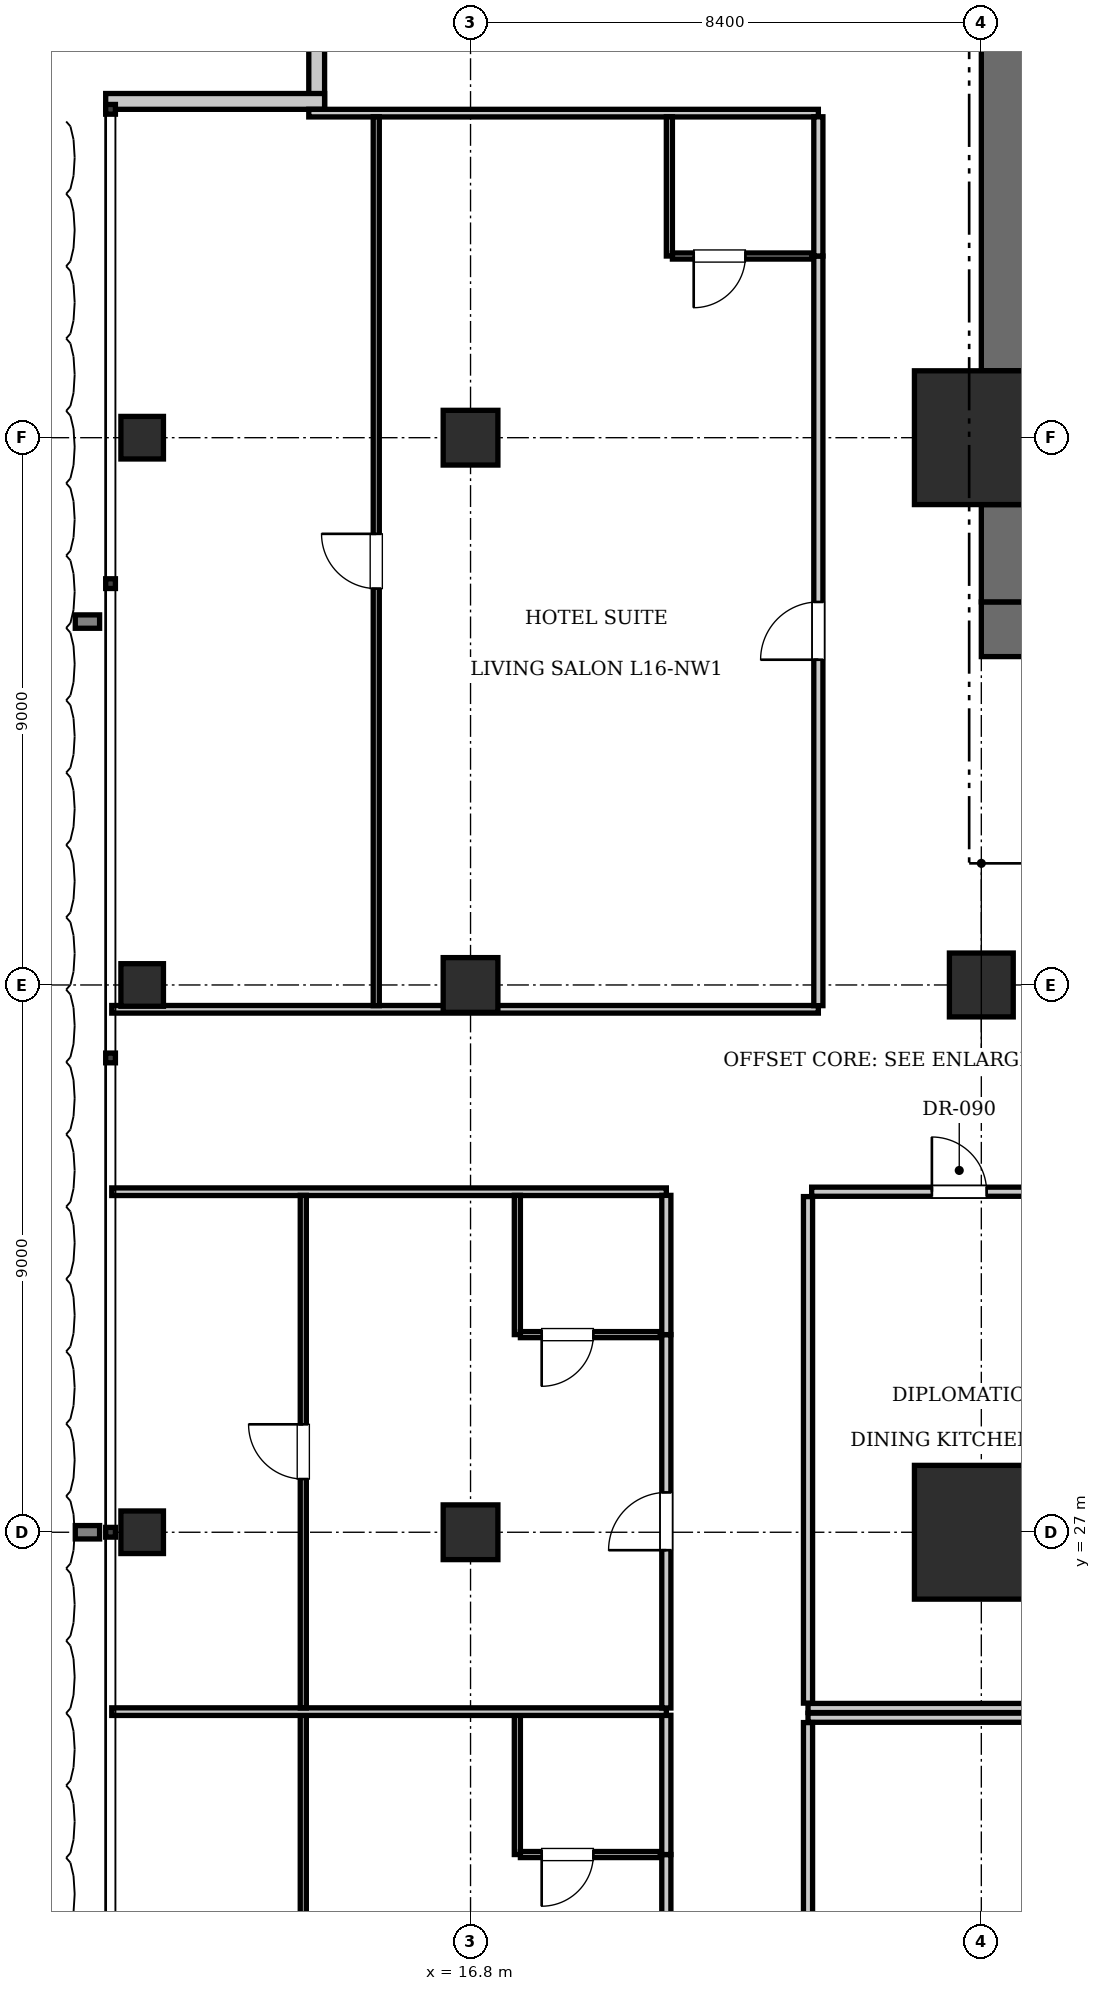
"""IFC4 building model, lengths in metres.
Left out: names, types, materials, properties, quantities, classifications, styles, units other than length and angle.
Written with IfcOpenShell. Run it as: python <this file> out.ifc"""

import sys

from ifc_helpers import new_model, si_unit, direction, frame, frame_2d, origin, origin_2d, place, context, subcontext, project, spatial, rectangle, i_section, extrude, element, fill, save


model = new_model("IFC4")
c1 = context("Model", 3, precision=1e-05, world=origin(), true_north=direction((0.0, 1.0)))
c2 = subcontext(c1, "Body", "Model", "MODEL_VIEW")
j1 = project(units=[si_unit("LENGTHUNIT", "METRE"), si_unit("PLANEANGLEUNIT", "RADIAN")], contexts=[c1])
p1 = place(None, origin())
s1 = spatial("IfcSite", under=j1, at=p1, CompositionType="ELEMENT")
p2 = place(p1, origin())
s2 = spatial("IfcBuilding", under=s1, at=p2, CompositionType="ELEMENT")
p3 = place(p2, frame((0.0, 0.0, 69.3)))
s3 = spatial("IfcBuildingStorey", under=s2, at=p3, CompositionType="ELEMENT", Elevation=69.3)
for number, where, z_axis, x_axis in (
    (1, (25.2, 27.0, 0.0), (0.0, 0.0, 1.0), (1.0, 0.0, 0.0)),
    (2, (25.2, 45.0, 0.0), (0.0, 0.0, 1.0), (1.0, 0.0, 0.0)),
):
    element("IfcColumn", number, at=place(p3, frame(where, z_axis=z_axis, x_axis=x_axis)), inside=s3, PredefinedType="COLUMN", context=c2, shape_type="SweptSolid", body=[
        extrude(rectangle(XDim=2.2, YDim=2.2, at=origin_2d()), origin(), (0.0, 0.0, 1.0), 3.85),
    ])
p4 = place(p3, frame((25.2, 41.85, 0.0), z_axis=(0.0, 0.0, 1.0), x_axis=(1.0, 0.0, 0.0)))
e3 = element("IfcWall", 3, at=p4, inside=s3, PredefinedType="SHEAR", context=c2, shape_type="SweptSolid", body=[
    extrude(rectangle(XDim=6.8, YDim=0.9, at=frame_2d((3.4, 0.0))), origin(), (0.0, 0.0, 1.0), 3.85),
])
p5 = place(p4, frame((1.65, 0.0, 0.0)))
e4 = element("IfcOpeningElement", 4, at=p5, cuts=e3, PredefinedType="OPENING", context=c2, shape_type="SweptSolid", body=[
    extrude(rectangle(XDim=1.15, YDim=2.15, at=frame_2d((0.575, 1.075))), frame((0.0, 0.46, 0.0), z_axis=(0.0, -1.0, 0.0), x_axis=(1.0, 0.0, 0.0)), (0.0, 0.0, 1.0), 0.92),
])
p6 = place(p4, frame((5.15, 0.0, 0.0)))
e5 = element("IfcOpeningElement", 5, at=p6, cuts=e3, PredefinedType="OPENING", context=c2, shape_type="SweptSolid", body=[
    extrude(rectangle(XDim=1.1, YDim=2.2, at=frame_2d((0.55, 1.1))), frame((0.0, 0.46, 0.0), z_axis=(0.0, -1.0, 0.0), x_axis=(1.0, 0.0, 0.0)), (0.0, 0.0, 1.0), 0.92),
])
p7 = place(p3, frame((25.65, 42.3, 0.0), z_axis=(0.0, 0.0, 1.0), x_axis=(0.0, 1.0, 0.0)))
e6 = element("IfcWall", 6, at=p7, inside=s3, PredefinedType="SHEAR", context=c2, shape_type="SweptSolid", body=[
    extrude(rectangle(XDim=1.6, YDim=0.9, at=frame_2d((0.8, 0.0))), origin(), (0.0, 0.0, 1.0), 3.85),
])
p8 = place(p3, frame((25.65, 46.1, 0.0), z_axis=(0.0, 0.0, 1.0), x_axis=(0.0, 1.0, 0.0)))
e7 = element("IfcWall", 7, at=p8, inside=s3, PredefinedType="SHEAR", context=c2, shape_type="SweptSolid", body=[
    extrude(rectangle(XDim=7.0, YDim=0.9, at=frame_2d((3.5, 0.0))), origin(), (0.0, 0.0, 1.0), 3.85),
])
p9 = place(p3, frame((25.2, 36.0, 0.0), z_axis=(0.0, 0.0, 1.0), x_axis=(1.0, 0.0, 0.0)))
e8 = element("IfcColumn", 8, at=p9, inside=s3, PredefinedType="COLUMN", context=c2, shape_type="SweptSolid", body=[
    extrude(rectangle(XDim=1.05, YDim=1.05, at=origin_2d()), origin(), (0.0, 0.0, 1.0), 3.85),
])
for number, where, z_axis, x_axis in (
    (9, (16.8, 27.0, 0.0), (0.0, 0.0, 1.0), (1.0, 0.0, 0.0)),
    (10, (16.8, 36.0, 0.0), (0.0, 0.0, 1.0), (1.0, 0.0, 0.0)),
    (11, (16.8, 45.0, 0.0), (0.0, 0.0, 1.0), (1.0, 0.0, 0.0)),
):
    element("IfcColumn", number, at=place(p3, frame(where, z_axis=z_axis, x_axis=x_axis)), inside=s3, PredefinedType="COLUMN", context=c2, shape_type="SweptSolid", body=[
        extrude(rectangle(XDim=0.9, YDim=0.9, at=origin_2d()), origin(), (0.0, 0.0, 1.0), 3.85),
    ])
for number, where, z_axis, x_axis in (
    (12, (11.4, 27.0, 0.0), (0.0, 0.0, 1.0), (1.0, 0.0, 0.0)),
    (13, (11.4, 36.0, 0.0), (0.0, 0.0, 1.0), (1.0, 0.0, 0.0)),
    (14, (11.4, 45.0, 0.0), (0.0, 0.0, 1.0), (1.0, 0.0, 0.0)),
):
    element("IfcColumn", number, at=place(p3, frame(where, z_axis=z_axis, x_axis=x_axis)), inside=s3, PredefinedType="COLUMN", context=c2, shape_type="SweptSolid", body=[
        extrude(i_section(OverallWidth=0.7, OverallDepth=0.7, WebThickness=0.028, FlangeThickness=0.044, at=origin_2d()), origin(), (0.0, 0.0, 1.0), 3.85),
    ])
p10 = place(p3, frame((14.27, 50.4, 0.0), z_axis=(0.0, 0.0, 1.0), x_axis=(0.0, 1.0, 0.0)))
e15 = element("IfcWall", 15, at=p10, inside=s3, PredefinedType="SOLIDWALL", context=c2, shape_type="SweptSolid", body=[
    extrude(rectangle(XDim=3.6, YDim=0.26, at=frame_2d((1.8, 0.0))), origin(), (0.0, 0.0, 1.0), 3.61),
])
p11 = place(p3, frame((10.8, 50.53, 0.0), z_axis=(0.0, 0.0, 1.0), x_axis=(1.0, 0.0, 0.0)))
e16 = element("IfcWall", 16, at=p11, inside=s3, PredefinedType="SOLIDWALL", context=c2, shape_type="SweptSolid", body=[
    extrude(rectangle(XDim=3.6, YDim=0.26, at=frame_2d((1.8, 0.0))), origin(), (0.0, 0.0, 1.0), 3.61),
])
p12 = place(p3, frame((22.35, 24.11, 0.0), z_axis=(0.0, 0.0, 1.0), x_axis=(1.0, 0.0, 0.0)))
e17 = element("IfcWall", 17, at=p12, inside=s3, PredefinedType="PARTITIONING", context=c2, shape_type="SweptSolid", body=[
    extrude(rectangle(XDim=30.9, YDim=0.15, at=frame_2d((15.45, 0.0))), origin(), (0.0, 0.0, 1.0), 3.61),
])
p13 = place(p3, frame((22.35, 24.19, 0.0), z_axis=(0.0, 0.0, 1.0), x_axis=(0.0, 1.0, 0.0)))
e18 = element("IfcWall", 18, at=p13, inside=s3, PredefinedType="PARTITIONING", context=c2, shape_type="SweptSolid", body=[
    extrude(rectangle(XDim=8.33, YDim=0.15, at=frame_2d((4.165, 0.0))), origin(), (0.0, 0.0, 1.0), 3.61),
])
p14 = place(p3, frame((22.41, 32.6, 0.0), z_axis=(0.0, 0.0, 1.0), x_axis=(1.0, 0.0, 0.0)))
e19 = element("IfcWall", 19, at=p14, inside=s3, PredefinedType="PARTITIONING", context=c2, shape_type="SweptSolid", body=[
    extrude(rectangle(XDim=4.854, YDim=0.15, at=frame_2d((2.427, 0.0))), origin(), (0.0, 0.0, 1.0), 3.61),
])
p15 = place(p14, frame((1.977, 0.0, 0.0)))
e20 = element("IfcOpeningElement", 20, at=p15, cuts=e19, PredefinedType="OPENING", context=c2, shape_type="SweptSolid", body=[
    extrude(rectangle(XDim=0.9, YDim=2.1, at=frame_2d((0.45, 1.05))), frame((0.0, 0.085, 0.0), z_axis=(0.0, -1.0, 0.0), x_axis=(1.0, 0.0, 0.0)), (0.0, 0.0, 1.0), 0.17),
])
p16 = place(p3, frame((22.35, 23.95, 0.0), z_axis=(0.0, 0.0, 1.0), x_axis=(1.0, 0.0, 0.0)))
e21 = element("IfcWall", 21, at=p16, inside=s3, PredefinedType="PARTITIONING", context=c2, shape_type="SweptSolid", body=[
    extrude(rectangle(XDim=30.9, YDim=0.15, at=frame_2d((15.45, 0.0))), origin(), (0.0, 0.0, 1.0), 3.61),
])
p17 = place(p3, frame((22.35, 15.53, 0.0), z_axis=(0.0, 0.0, 1.0), x_axis=(0.0, 1.0, 0.0)))
e22 = element("IfcWall", 22, at=p17, inside=s3, PredefinedType="PARTITIONING", context=c2, shape_type="SweptSolid", body=[
    extrude(rectangle(XDim=8.34, YDim=0.15, at=frame_2d((4.17, 0.0))), origin(), (0.0, 0.0, 1.0), 3.61),
])
p18 = place(p3, frame((10.9, 32.6, 0.0), z_axis=(0.0, 0.0, 1.0), x_axis=(1.0, 0.0, 0.0)))
e23 = element("IfcWall", 23, at=p18, inside=s3, PredefinedType="PARTITIONING", context=c2, shape_type="SweptSolid", body=[
    extrude(rectangle(XDim=9.12, YDim=0.125, at=frame_2d((4.56, 0.0))), origin(), (0.0, 0.0, 1.0), 3.61),
])
p19 = place(p3, frame((20.02, 15.56, 0.0), z_axis=(0.0, 0.0, 1.0), x_axis=(0.0, 1.0, 0.0)))
e24 = element("IfcWall", 24, at=p19, inside=s3, PredefinedType="PARTITIONING", context=c2, shape_type="SweptSolid", body=[
    extrude(rectangle(XDim=6.14, YDim=0.15, at=frame_2d((3.07, 0.0))), origin(), (0.0, 0.0, 1.0), 3.61),
])
p20 = place(p19, frame((2.595, 0.0, 0.0)))
e25 = element("IfcOpeningElement", 25, at=p20, cuts=e24, PredefinedType="OPENING", context=c2, shape_type="SweptSolid", body=[
    extrude(rectangle(XDim=0.95, YDim=2.15, at=frame_2d((0.475, 1.075))), frame((0.0, 0.085, 0.0), z_axis=(0.0, -1.0, 0.0), x_axis=(1.0, 0.0, 0.0)), (0.0, 0.0, 1.0), 0.17),
])
p21 = place(p3, frame((20.02, 21.7, 0.0), z_axis=(0.0, 0.0, 1.0), x_axis=(0.0, 1.0, 0.0)))
e26 = element("IfcWall", 26, at=p21, inside=s3, PredefinedType="PARTITIONING", context=c2, shape_type="SweptSolid", body=[
    extrude(rectangle(XDim=2.29, YDim=0.15, at=frame_2d((1.145, 0.0))), origin(), (0.0, 0.0, 1.0), 3.61),
])
p22 = place(p3, frame((17.57, 21.7, 0.0), z_axis=(0.0, 0.0, 1.0), x_axis=(0.0, 1.0, 0.0)))
e27 = element("IfcWall", 27, at=p22, inside=s3, PredefinedType="PARTITIONING", context=c2, shape_type="SweptSolid", body=[
    extrude(rectangle(XDim=2.29, YDim=0.1, at=frame_2d((1.145, 0.0))), origin(), (0.0, 0.0, 1.0), 3.61),
])
p23 = place(p3, frame((17.62, 21.7, 0.0), z_axis=(0.0, 0.0, 1.0), x_axis=(1.0, 0.0, 0.0)))
e28 = element("IfcWall", 28, at=p23, inside=s3, PredefinedType="PARTITIONING", context=c2, shape_type="SweptSolid", body=[
    extrude(rectangle(XDim=2.3, YDim=0.1, at=frame_2d((1.15, 0.0))), origin(), (0.0, 0.0, 1.0), 3.61),
])
p24 = place(p23, frame((0.35, 0.0, 0.0)))
e29 = element("IfcOpeningElement", 29, at=p24, cuts=e28, PredefinedType="OPENING", context=c2, shape_type="SweptSolid", body=[
    extrude(rectangle(XDim=0.85, YDim=2.1, at=frame_2d((0.425, 1.05))), frame((0.0, 0.06, 0.0), z_axis=(0.0, -1.0, 0.0), x_axis=(1.0, 0.0, 0.0)), (0.0, 0.0, 1.0), 0.12),
])
p25 = place(p3, frame((14.05, 15.56, 0.0), z_axis=(0.0, 0.0, 1.0), x_axis=(0.0, 1.0, 0.0)))
e30 = element("IfcWall", 30, at=p25, inside=s3, PredefinedType="PARTITIONING", context=c2, shape_type="SweptSolid", body=[
    extrude(rectangle(XDim=8.43, YDim=0.1, at=frame_2d((4.215, 0.0))), origin(), (0.0, 0.0, 1.0), 3.403),
])
p26 = place(p25, frame((3.765, 0.0, 0.0)))
e31 = element("IfcOpeningElement", 31, at=p26, cuts=e30, PredefinedType="OPENING", context=c2, shape_type="SweptSolid", body=[
    extrude(rectangle(XDim=0.9, YDim=2.1, at=frame_2d((0.45, 1.05))), frame((0.0, 0.06, 0.0), z_axis=(0.0, -1.0, 0.0), x_axis=(1.0, 0.0, 0.0)), (0.0, 0.0, 1.0), 0.12),
])
p27 = place(p3, frame((10.9, 24.05, 0.0), z_axis=(0.0, 0.0, 1.0), x_axis=(1.0, 0.0, 0.0)))
e32 = element("IfcWall", 32, at=p27, inside=s3, PredefinedType="PARTITIONING", context=c2, shape_type="SweptSolid", body=[
    extrude(rectangle(XDim=9.12, YDim=0.125, at=frame_2d((4.56, 0.0))), origin(), (0.0, 0.0, 1.0), 3.61),
])
p28 = place(p3, frame((20.02, 24.11, 0.0), z_axis=(0.0, 0.0, 1.0), x_axis=(0.0, 1.0, 0.0)))
e33 = element("IfcWall", 33, at=p28, inside=s3, PredefinedType="PARTITIONING", context=c2, shape_type="SweptSolid", body=[
    extrude(rectangle(XDim=6.14, YDim=0.15, at=frame_2d((3.07, 0.0))), origin(), (0.0, 0.0, 1.0), 3.61),
])
p29 = place(p28, frame((2.595, 0.0, 0.0)))
e34 = element("IfcOpeningElement", 34, at=p29, cuts=e33, PredefinedType="OPENING", context=c2, shape_type="SweptSolid", body=[
    extrude(rectangle(XDim=0.95, YDim=2.15, at=frame_2d((0.475, 1.075))), frame((0.0, 0.085, 0.0), z_axis=(0.0, -1.0, 0.0), x_axis=(1.0, 0.0, 0.0)), (0.0, 0.0, 1.0), 0.17),
])
p30 = place(p3, frame((20.02, 30.25, 0.0), z_axis=(0.0, 0.0, 1.0), x_axis=(0.0, 1.0, 0.0)))
e35 = element("IfcWall", 35, at=p30, inside=s3, PredefinedType="PARTITIONING", context=c2, shape_type="SweptSolid", body=[
    extrude(rectangle(XDim=2.29, YDim=0.15, at=frame_2d((1.145, 0.0))), origin(), (0.0, 0.0, 1.0), 3.61),
])
p31 = place(p3, frame((17.57, 30.25, 0.0), z_axis=(0.0, 0.0, 1.0), x_axis=(0.0, 1.0, 0.0)))
e36 = element("IfcWall", 36, at=p31, inside=s3, PredefinedType="PARTITIONING", context=c2, shape_type="SweptSolid", body=[
    extrude(rectangle(XDim=2.29, YDim=0.1, at=frame_2d((1.145, 0.0))), origin(), (0.0, 0.0, 1.0), 3.61),
])
p32 = place(p3, frame((17.62, 30.25, 0.0), z_axis=(0.0, 0.0, 1.0), x_axis=(1.0, 0.0, 0.0)))
e37 = element("IfcWall", 37, at=p32, inside=s3, PredefinedType="PARTITIONING", context=c2, shape_type="SweptSolid", body=[
    extrude(rectangle(XDim=2.3, YDim=0.1, at=frame_2d((1.15, 0.0))), origin(), (0.0, 0.0, 1.0), 3.61),
])
p33 = place(p32, frame((0.35, 0.0, 0.0)))
e38 = element("IfcOpeningElement", 38, at=p33, cuts=e37, PredefinedType="OPENING", context=c2, shape_type="SweptSolid", body=[
    extrude(rectangle(XDim=0.85, YDim=2.1, at=frame_2d((0.425, 1.05))), frame((0.0, 0.06, 0.0), z_axis=(0.0, -1.0, 0.0), x_axis=(1.0, 0.0, 0.0)), (0.0, 0.0, 1.0), 0.12),
])
p34 = place(p3, frame((14.05, 24.11, 0.0), z_axis=(0.0, 0.0, 1.0), x_axis=(0.0, 1.0, 0.0)))
e39 = element("IfcWall", 39, at=p34, inside=s3, PredefinedType="PARTITIONING", context=c2, shape_type="SweptSolid", body=[
    extrude(rectangle(XDim=8.43, YDim=0.1, at=frame_2d((4.215, 0.0))), origin(), (0.0, 0.0, 1.0), 3.207),
])
p35 = place(p34, frame((3.765, 0.0, 0.0)))
e40 = element("IfcOpeningElement", 40, at=p35, cuts=e39, PredefinedType="OPENING", context=c2, shape_type="SweptSolid", body=[
    extrude(rectangle(XDim=0.9, YDim=2.1, at=frame_2d((0.45, 1.05))), frame((0.0, 0.06, 0.0), z_axis=(0.0, -1.0, 0.0), x_axis=(1.0, 0.0, 0.0)), (0.0, 0.0, 1.0), 0.12),
])
p36 = place(p3, frame((10.9, 35.6, 0.0), z_axis=(0.0, 0.0, 1.0), x_axis=(1.0, 0.0, 0.0)))
e41 = element("IfcWall", 41, at=p36, inside=s3, PredefinedType="PARTITIONING", context=c2, shape_type="SweptSolid", body=[
    extrude(rectangle(XDim=11.62, YDim=0.125, at=frame_2d((5.81, 0.0))), origin(), (0.0, 0.0, 1.0), 3.61),
])
p37 = place(p3, frame((14.14, 50.337, 0.0), z_axis=(0.0, 0.0, 1.0), x_axis=(1.0, 0.0, 0.0)))
e42 = element("IfcWall", 42, at=p37, inside=s3, PredefinedType="PARTITIONING", context=c2, shape_type="SweptSolid", body=[
    extrude(rectangle(XDim=8.38, YDim=0.125, at=frame_2d((4.19, 0.0))), origin(), (0.0, 0.0, 1.0), 3.61),
])
p38 = place(p3, frame((22.52, 35.66, 0.0), z_axis=(0.0, 0.0, 1.0), x_axis=(0.0, 1.0, 0.0)))
e43 = element("IfcWall", 43, at=p38, inside=s3, PredefinedType="PARTITIONING", context=c2, shape_type="SweptSolid", body=[
    extrude(rectangle(XDim=12.328, YDim=0.15, at=frame_2d((6.164, 0.0))), origin(), (0.0, 0.0, 1.0), 3.61),
])
p39 = place(p38, frame((5.689, 0.0, 0.0)))
e44 = element("IfcOpeningElement", 44, at=p39, cuts=e43, PredefinedType="OPENING", context=c2, shape_type="SweptSolid", body=[
    extrude(rectangle(XDim=0.95, YDim=2.15, at=frame_2d((0.475, 1.075))), frame((0.0, 0.085, 0.0), z_axis=(0.0, -1.0, 0.0), x_axis=(1.0, 0.0, 0.0)), (0.0, 0.0, 1.0), 0.17),
])
p40 = place(p3, frame((22.52, 47.988, 0.0), z_axis=(0.0, 0.0, 1.0), x_axis=(0.0, 1.0, 0.0)))
e45 = element("IfcWall", 45, at=p40, inside=s3, PredefinedType="PARTITIONING", context=c2, shape_type="SweptSolid", body=[
    extrude(rectangle(XDim=2.29, YDim=0.15, at=frame_2d((1.145, 0.0))), origin(), (0.0, 0.0, 1.0), 3.61),
])
p41 = place(p3, frame((20.07, 47.988, 0.0), z_axis=(0.0, 0.0, 1.0), x_axis=(0.0, 1.0, 0.0)))
e46 = element("IfcWall", 46, at=p41, inside=s3, PredefinedType="PARTITIONING", context=c2, shape_type="SweptSolid", body=[
    extrude(rectangle(XDim=2.29, YDim=0.1, at=frame_2d((1.145, 0.0))), origin(), (0.0, 0.0, 1.0), 3.61),
])
p42 = place(p3, frame((20.12, 47.988, 0.0), z_axis=(0.0, 0.0, 1.0), x_axis=(1.0, 0.0, 0.0)))
e47 = element("IfcWall", 47, at=p42, inside=s3, PredefinedType="PARTITIONING", context=c2, shape_type="SweptSolid", body=[
    extrude(rectangle(XDim=2.3, YDim=0.1, at=frame_2d((1.15, 0.0))), origin(), (0.0, 0.0, 1.0), 3.61),
])
p43 = place(p42, frame((0.35, 0.0, 0.0)))
e48 = element("IfcOpeningElement", 48, at=p43, cuts=e47, PredefinedType="OPENING", context=c2, shape_type="SweptSolid", body=[
    extrude(rectangle(XDim=0.85, YDim=2.1, at=frame_2d((0.425, 1.05))), frame((0.0, 0.06, 0.0), z_axis=(0.0, -1.0, 0.0), x_axis=(1.0, 0.0, 0.0)), (0.0, 0.0, 1.0), 0.12),
])
p44 = place(p3, frame((15.25, 35.66, 0.0), z_axis=(0.0, 0.0, 1.0), x_axis=(0.0, 1.0, 0.0)))
e49 = element("IfcWall", 49, at=p44, inside=s3, PredefinedType="PARTITIONING", context=c2, shape_type="SweptSolid", body=[
    extrude(rectangle(XDim=14.618, YDim=0.1, at=frame_2d((7.309, 0.0))), origin(), (0.0, 0.0, 1.0), 3.61),
])
p45 = place(p44, frame((6.859, 0.0, 0.0)))
e50 = element("IfcOpeningElement", 50, at=p45, cuts=e49, PredefinedType="OPENING", context=c2, shape_type="SweptSolid", body=[
    extrude(rectangle(XDim=0.9, YDim=2.1, at=frame_2d((0.45, 1.05))), frame((0.0, 0.06, 0.0), z_axis=(0.0, -1.0, 0.0), x_axis=(1.0, 0.0, 0.0)), (0.0, 0.0, 1.0), 0.12),
])
p46 = place(p15, origin())
e51 = element("IfcDoor", 51, at=p46, inside=s3, OperationType="SINGLE_SWING_LEFT", PredefinedType="DOOR", context=c2, shape_type="SweptSolid", body=[
    extrude(rectangle(XDim=0.9, YDim=2.1, at=frame_2d((0.45, 1.05))), frame((0.0, 0.025, 0.0), z_axis=(0.0, -1.0, 0.0), x_axis=(1.0, 0.0, 0.0)), (0.0, 0.0, 1.0), 0.05),
])
fill(e20, e51)
p47 = place(p24, frame((0.85, 0.0, 0.0), z_axis=(0.0, 0.0, 1.0), x_axis=(-1.0, 0.0, 0.0)))
e52 = element("IfcDoor", 52, at=p47, inside=s3, OperationType="SINGLE_SWING_RIGHT", PredefinedType="DOOR", context=c2, shape_type="SweptSolid", body=[
    extrude(rectangle(XDim=0.85, YDim=2.1, at=frame_2d((0.425, 1.05))), frame((0.0, 0.025, 0.0), z_axis=(0.0, -1.0, 0.0), x_axis=(1.0, 0.0, 0.0)), (0.0, 0.0, 1.0), 0.05),
])
fill(e29, e52)
p48 = place(p33, frame((0.85, 0.0, 0.0), z_axis=(0.0, 0.0, 1.0), x_axis=(-1.0, 0.0, 0.0)))
e53 = element("IfcDoor", 53, at=p48, inside=s3, OperationType="SINGLE_SWING_RIGHT", PredefinedType="DOOR", context=c2, shape_type="SweptSolid", body=[
    extrude(rectangle(XDim=0.85, YDim=2.1, at=frame_2d((0.425, 1.05))), frame((0.0, 0.025, 0.0), z_axis=(0.0, -1.0, 0.0), x_axis=(1.0, 0.0, 0.0)), (0.0, 0.0, 1.0), 0.05),
])
fill(e38, e53)
p49 = place(p29, origin())
e54 = element("IfcDoor", 54, at=p49, inside=s3, OperationType="SINGLE_SWING_LEFT", PredefinedType="DOOR", context=c2, shape_type="SweptSolid", body=[
    extrude(rectangle(XDim=0.95, YDim=2.15, at=frame_2d((0.475, 1.075))), frame((0.0, 0.025, 0.0), z_axis=(0.0, -1.0, 0.0), x_axis=(1.0, 0.0, 0.0)), (0.0, 0.0, 1.0), 0.05),
])
fill(e34, e54)
p50 = place(p35, origin())
e55 = element("IfcDoor", 55, at=p50, inside=s3, OperationType="SINGLE_SWING_RIGHT", PredefinedType="DOOR", context=c2, shape_type="SweptSolid", body=[
    extrude(rectangle(XDim=0.9, YDim=2.1, at=frame_2d((0.45, 1.05))), frame((0.0, 0.025, 0.0), z_axis=(0.0, -1.0, 0.0), x_axis=(1.0, 0.0, 0.0)), (0.0, 0.0, 1.0), 0.05),
])
fill(e40, e55)
p51 = place(p43, frame((0.85, 0.0, 0.0), z_axis=(0.0, 0.0, 1.0), x_axis=(-1.0, 0.0, 0.0)))
e56 = element("IfcDoor", 56, at=p51, inside=s3, OperationType="SINGLE_SWING_RIGHT", PredefinedType="DOOR", context=c2, shape_type="SweptSolid", body=[
    extrude(rectangle(XDim=0.85, YDim=2.1, at=frame_2d((0.425, 1.05))), frame((0.0, 0.025, 0.0), z_axis=(0.0, -1.0, 0.0), x_axis=(1.0, 0.0, 0.0)), (0.0, 0.0, 1.0), 0.05),
])
fill(e48, e56)
p52 = place(p39, origin())
e57 = element("IfcDoor", 57, at=p52, inside=s3, OperationType="SINGLE_SWING_LEFT", PredefinedType="DOOR", context=c2, shape_type="SweptSolid", body=[
    extrude(rectangle(XDim=0.95, YDim=2.15, at=frame_2d((0.475, 1.075))), frame((0.0, 0.025, 0.0), z_axis=(0.0, -1.0, 0.0), x_axis=(1.0, 0.0, 0.0)), (0.0, 0.0, 1.0), 0.05),
])
fill(e44, e57)
p53 = place(p45, origin())
e58 = element("IfcDoor", 58, at=p53, inside=s3, OperationType="SINGLE_SWING_RIGHT", PredefinedType="DOOR", context=c2, shape_type="SweptSolid", body=[
    extrude(rectangle(XDim=0.9, YDim=2.1, at=frame_2d((0.45, 1.05))), frame((0.0, 0.025, 0.0), z_axis=(0.0, -1.0, 0.0), x_axis=(1.0, 0.0, 0.0)), (0.0, 0.0, 1.0), 0.05),
])
fill(e50, e58)
save(model, sys.argv[1])
